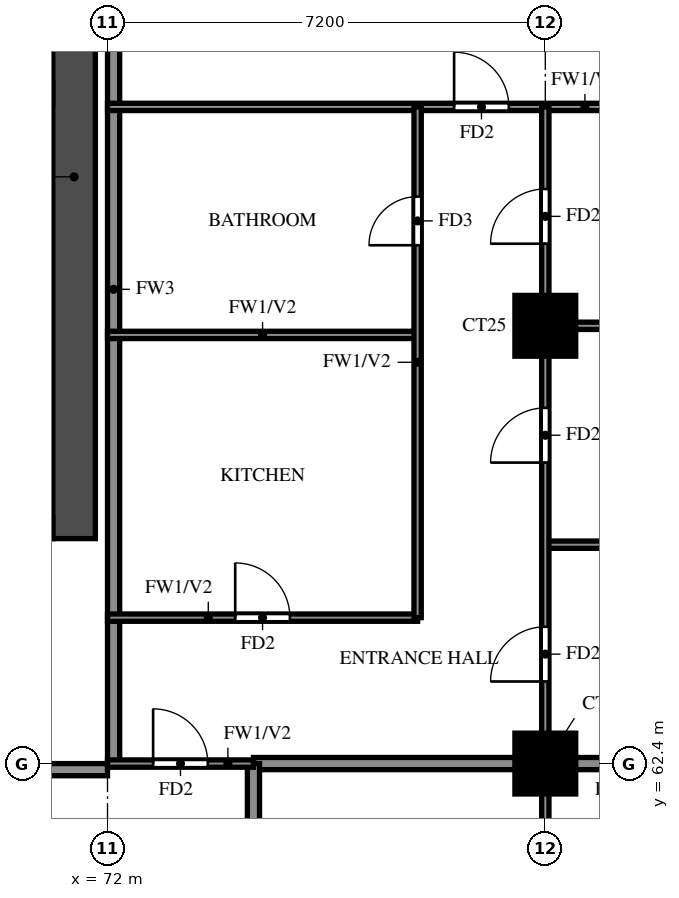
"""IFC4 building model, lengths in metres.
Left out: names, types, materials, properties, quantities, classifications, styles, units other than length and angle.
Written with IfcOpenShell. Run it as: python <this file> out.ifc"""

import sys

from ifc_helpers import new_model, si_unit, direction, frame, frame_2d, origin, origin_2d, place, context, subcontext, project, spatial, rectangle, extrude, source, transform, mapped, element, fill, save


model = new_model("IFC4")
c1 = context("Model", 3, precision=1e-05, world=origin(), true_north=direction((0.0, 1.0)))
c2 = subcontext(c1, "Body", "Model", "MODEL_VIEW")
j1 = project(units=[si_unit("LENGTHUNIT", "METRE"), si_unit("PLANEANGLEUNIT", "RADIAN")], contexts=[c1])
p1 = place(None, origin())
s1 = spatial("IfcSite", under=j1, at=p1, CompositionType="ELEMENT")
p2 = place(p1, origin())
s2 = spatial("IfcBuilding", under=s1, at=p2, CompositionType="ELEMENT")
p3 = place(p2, frame((0.0, 0.0, 157.0)))
s3 = spatial("IfcBuildingStorey", under=s2, at=p3, CompositionType="ELEMENT", Elevation=157.0)
m1 = source(origin(), c2, "Body", "SweptSolid", [
    extrude(rectangle(XDim=1.0, YDim=1.0, at=origin_2d()), origin(), (0.0, 0.0, 1.0), 3.2),
])
for number, where, z_axis, x_axis in (
    (1, (79.2, 62.4, 0.0), (0.0, 0.0, 1.0), (1.0, 0.0, 0.0)),
    (2, (79.2, 69.6, 0.0), (0.0, 0.0, 1.0), (1.0, 0.0, 0.0)),
):
    element("IfcColumn", number, at=place(p3, frame(where, z_axis=z_axis, x_axis=x_axis)), inside=s3, PredefinedType="COLUMN", context=c2, shape_type="MappedRepresentation", body=[
        mapped(m1, transform((0.0, 0.0, 0.0))),
    ])
p4 = place(p3, frame((71.45, 66.1, 0.0), z_axis=(0.0, 0.0, 1.0), x_axis=(0.0, 1.0, 0.0)))
e3 = element("IfcWall", 3, at=p4, inside=s3, PredefinedType="SHEAR", context=c2, shape_type="SweptSolid", body=[
    extrude(rectangle(XDim=11.9, YDim=0.7, at=frame_2d((5.95, 0.0))), origin(), (0.0, 0.0, 1.0), 3.2),
])
p5 = place(p3, frame((29.7, 66.275, 0.0), z_axis=(0.0, 0.0, 1.0), x_axis=(1.0, 0.0, 0.0)))
e4 = element("IfcWall", 4, at=p5, inside=s3, PredefinedType="SHEAR", context=c2, shape_type="SweptSolid", body=[
    extrude(rectangle(XDim=41.4, YDim=0.35, at=frame_2d((20.7, 0.0))), origin(), (0.0, 0.0, 1.0), 3.2),
])
p6 = place(p5, frame((0.925, 0.0, 0.0)))
e5 = element("IfcOpeningElement", 5, at=p6, cuts=e4, PredefinedType="OPENING", context=c2, shape_type="SweptSolid", body=[
    extrude(rectangle(XDim=1.1, YDim=2.1, at=frame_2d((0.55, 1.05))), frame((0.0, 0.185, 0.0), z_axis=(0.0, -1.0, 0.0), x_axis=(1.0, 0.0, 0.0)), (0.0, 0.0, 1.0), 0.37),
])
p7 = place(p5, frame((3.712, 0.0, 0.0)))
e6 = element("IfcOpeningElement", 6, at=p7, cuts=e4, PredefinedType="OPENING", context=c2, shape_type="SweptSolid", body=[
    extrude(rectangle(XDim=1.8, YDim=2.1, at=frame_2d((0.9, 1.05))), frame((0.0, 0.185, 0.0), z_axis=(0.0, -1.0, 0.0), x_axis=(1.0, 0.0, 0.0)), (0.0, 0.0, 1.0), 0.37),
])
p8 = place(p3, frame((67.2, 62.3, 0.0), z_axis=(0.0, 0.0, 1.0), x_axis=(1.0, 0.0, 0.0)))
e7 = element("IfcWall", 7, at=p8, inside=s3, PredefinedType="SOLIDWALL", context=c2, shape_type="SweptSolid", body=[
    extrude(rectangle(XDim=4.8, YDim=0.2, at=frame_2d((2.4, 0.0))), origin(), (0.0, 0.0, 1.0), 3.2),
])
p9 = place(p3, frame((72.1, 62.4, 0.0), z_axis=(0.0, 0.0, 1.0), x_axis=(0.0, 1.0, 0.0)))
e8 = element("IfcWall", 8, at=p9, inside=s3, PredefinedType="SOLIDWALL", context=c2, shape_type="SweptSolid", body=[
    extrude(rectangle(XDim=15.6, YDim=0.2, at=frame_2d((7.8, 0.0))), origin(), (0.0, 0.0, 1.0), 3.2),
])
p10 = place(p3, frame((74.4, 62.4, 0.0), z_axis=(0.0, 0.0, 1.0), x_axis=(1.0, 0.0, 0.0)))
e9 = element("IfcWall", 9, at=p10, inside=s3, PredefinedType="SOLIDWALL", context=c2, shape_type="SweptSolid", body=[
    extrude(rectangle(XDim=11.875, YDim=0.2, at=frame_2d((5.938, 0.0))), origin(), (0.0, 0.0, 1.0), 3.2),
])
p11 = place(p3, frame((74.4, 60.0, 0.0), z_axis=(0.0, 0.0, 1.0), x_axis=(0.0, 1.0, 0.0)))
e10 = element("IfcWall", 10, at=p11, inside=s3, PredefinedType="SOLIDWALL", context=c2, shape_type="SweptSolid", body=[
    extrude(rectangle(XDim=2.4, YDim=0.2, at=frame_2d((1.2, 0.0))), origin(), (0.0, 0.0, 1.0), 3.2),
])
p12 = place(p3, frame((72.0, 62.4, 0.0), z_axis=(0.0, 0.0, 1.0), x_axis=(1.0, 0.0, 0.0)))
e11 = element("IfcWall", 11, at=p12, inside=s3, PredefinedType="PARTITIONING", context=c2, shape_type="SweptSolid", body=[
    extrude(rectangle(XDim=2.4, YDim=0.12, at=frame_2d((1.2, 0.0))), origin(), (0.0, 0.0, 1.0), 3.2),
])
p13 = place(p12, frame((0.75, 0.0, 0.0)))
e12 = element("IfcOpeningElement", 12, at=p13, cuts=e11, PredefinedType="OPENING", context=c2, shape_type="SweptSolid", body=[
    extrude(rectangle(XDim=0.9, YDim=2.1, at=frame_2d((0.45, 1.05))), frame((0.0, 0.07, 0.0), z_axis=(0.0, -1.0, 0.0), x_axis=(1.0, 0.0, 0.0)), (0.0, 0.0, 1.0), 0.14),
])
p14 = place(p3, frame((72.0, 64.8, 0.0), z_axis=(0.0, 0.0, 1.0), x_axis=(1.0, 0.0, 0.0)))
e13 = element("IfcWall", 13, at=p14, inside=s3, PredefinedType="PARTITIONING", context=c2, shape_type="SweptSolid", body=[
    extrude(rectangle(XDim=5.1, YDim=0.12, at=frame_2d((2.55, 0.0))), origin(), (0.0, 0.0, 1.0), 3.2),
])
p15 = place(p14, frame((2.1, 0.0, 0.0)))
e14 = element("IfcOpeningElement", 14, at=p15, cuts=e13, PredefinedType="OPENING", context=c2, shape_type="SweptSolid", body=[
    extrude(rectangle(XDim=0.9, YDim=2.1, at=frame_2d((0.45, 1.05))), frame((0.0, 0.07, 0.0), z_axis=(0.0, -1.0, 0.0), x_axis=(1.0, 0.0, 0.0)), (0.0, 0.0, 1.0), 0.14),
])
p16 = place(p3, frame((79.2, 66.0, 0.0), z_axis=(0.0, 0.0, 1.0), x_axis=(1.0, 0.0, 0.0)))
e15 = element("IfcWall", 15, at=p16, inside=s3, PredefinedType="PARTITIONING", context=c2, shape_type="SweptSolid", body=[
    extrude(rectangle(XDim=7.075, YDim=0.12, at=frame_2d((3.538, 0.0))), origin(), (0.0, 0.0, 1.0), 2.3),
])
p17 = place(p3, frame((72.0, 69.45, 0.0), z_axis=(0.0, 0.0, 1.0), x_axis=(1.0, 0.0, 0.0)))
e16 = element("IfcWall", 16, at=p17, inside=s3, PredefinedType="PARTITIONING", context=c2, shape_type="SweptSolid", body=[
    extrude(rectangle(XDim=5.1, YDim=0.12, at=frame_2d((2.55, 0.0))), origin(), (0.0, 0.0, 1.0), 3.2),
])
p18 = place(p3, frame((79.2, 69.6, 0.0), z_axis=(0.0, 0.0, 1.0), x_axis=(1.0, 0.0, 0.0)))
e17 = element("IfcWall", 17, at=p18, inside=s3, PredefinedType="PARTITIONING", context=c2, shape_type="SweptSolid", body=[
    extrude(rectangle(XDim=7.075, YDim=0.12, at=frame_2d((3.538, 0.0))), origin(), (0.0, 0.0, 1.0), 3.2),
])
p19 = place(p3, frame((72.0, 73.2, 0.0), z_axis=(0.0, 0.0, 1.0), x_axis=(1.0, 0.0, 0.0)))
e18 = element("IfcWall", 18, at=p19, inside=s3, PredefinedType="PARTITIONING", context=c2, shape_type="SweptSolid", body=[
    extrude(rectangle(XDim=14.275, YDim=0.12, at=frame_2d((7.137, 0.0))), origin(), (0.0, 0.0, 1.0), 2.3),
])
p20 = place(p19, frame((5.7, 0.0, 0.0)))
e19 = element("IfcOpeningElement", 19, at=p20, cuts=e18, PredefinedType="OPENING", context=c2, shape_type="SweptSolid", body=[
    extrude(rectangle(XDim=0.9, YDim=2.1, at=frame_2d((0.45, 1.05))), frame((0.0, 0.07, 0.0), z_axis=(0.0, -1.0, 0.0), x_axis=(1.0, 0.0, 0.0)), (0.0, 0.0, 1.0), 0.14),
])
p21 = place(p3, frame((77.1, 64.8, 0.0), z_axis=(0.0, 0.0, 1.0), x_axis=(0.0, 1.0, 0.0)))
e20 = element("IfcWall", 20, at=p21, inside=s3, PredefinedType="PARTITIONING", context=c2, shape_type="SweptSolid", body=[
    extrude(rectangle(XDim=8.4, YDim=0.12, at=frame_2d((4.2, 0.0))), origin(), (0.0, 0.0, 1.0), 3.2),
])
p22 = place(p21, frame((6.125, 0.0, 0.0)))
e21 = element("IfcOpeningElement", 21, at=p22, cuts=e20, PredefinedType="OPENING", context=c2, shape_type="SweptSolid", body=[
    extrude(rectangle(XDim=0.8, YDim=2.1, at=frame_2d((0.4, 1.05))), frame((0.0, 0.07, 0.0), z_axis=(0.0, -1.0, 0.0), x_axis=(1.0, 0.0, 0.0)), (0.0, 0.0, 1.0), 0.14),
])
p23 = place(p3, frame((79.2, 48.125, 0.0), z_axis=(0.0, 0.0, 1.0), x_axis=(0.0, 1.0, 0.0)))
e22 = element("IfcWall", 22, at=p23, inside=s3, PredefinedType="PARTITIONING", context=c2, shape_type="SweptSolid", body=[
    extrude(rectangle(XDim=25.075, YDim=0.12, at=frame_2d((12.538, 0.0))), origin(), (0.0, 0.0, 1.0), 3.2),
])
p24 = place(p23, frame((1.288, 0.0, 0.0)))
e23 = element("IfcOpeningElement", 23, at=p24, cuts=e22, PredefinedType="OPENING", context=c2, shape_type="SweptSolid", body=[
    extrude(rectangle(XDim=0.9, YDim=2.1, at=frame_2d((0.45, 1.05))), frame((0.0, 0.07, 0.0), z_axis=(0.0, -1.0, 0.0), x_axis=(1.0, 0.0, 0.0)), (0.0, 0.0, 1.0), 0.14),
])
p25 = place(p23, frame((4.825, 0.0, 0.0)))
e24 = element("IfcOpeningElement", 24, at=p25, cuts=e22, PredefinedType="OPENING", context=c2, shape_type="SweptSolid", body=[
    extrude(rectangle(XDim=0.9, YDim=2.1, at=frame_2d((0.45, 1.05))), frame((0.0, 0.07, 0.0), z_axis=(0.0, -1.0, 0.0), x_axis=(1.0, 0.0, 0.0)), (0.0, 0.0, 1.0), 0.14),
])
p26 = place(p23, frame((9.925, 0.0, 0.0)))
e25 = element("IfcOpeningElement", 25, at=p26, cuts=e22, PredefinedType="OPENING", context=c2, shape_type="SweptSolid", body=[
    extrude(rectangle(XDim=1.5, YDim=2.1, at=frame_2d((0.75, 1.05))), frame((0.0, 0.07, 0.0), z_axis=(0.0, -1.0, 0.0), x_axis=(1.0, 0.0, 0.0)), (0.0, 0.0, 1.0), 0.14),
])
p27 = place(p23, frame((15.625, 0.0, 0.0)))
e26 = element("IfcOpeningElement", 26, at=p27, cuts=e22, PredefinedType="OPENING", context=c2, shape_type="SweptSolid", body=[
    extrude(rectangle(XDim=0.9, YDim=2.1, at=frame_2d((0.45, 1.05))), frame((0.0, 0.07, 0.0), z_axis=(0.0, -1.0, 0.0), x_axis=(1.0, 0.0, 0.0)), (0.0, 0.0, 1.0), 0.14),
])
p28 = place(p23, frame((19.225, 0.0, 0.0)))
e27 = element("IfcOpeningElement", 27, at=p28, cuts=e22, PredefinedType="OPENING", context=c2, shape_type="SweptSolid", body=[
    extrude(rectangle(XDim=0.9, YDim=2.1, at=frame_2d((0.45, 1.05))), frame((0.0, 0.07, 0.0), z_axis=(0.0, -1.0, 0.0), x_axis=(1.0, 0.0, 0.0)), (0.0, 0.0, 1.0), 0.14),
])
p29 = place(p23, frame((22.825, 0.0, 0.0)))
e28 = element("IfcOpeningElement", 28, at=p29, cuts=e22, PredefinedType="OPENING", context=c2, shape_type="SweptSolid", body=[
    extrude(rectangle(XDim=0.9, YDim=2.1, at=frame_2d((0.45, 1.05))), frame((0.0, 0.07, 0.0), z_axis=(0.0, -1.0, 0.0), x_axis=(1.0, 0.0, 0.0)), (0.0, 0.0, 1.0), 0.14),
])
p30 = place(p13, origin())
e29 = element("IfcDoor", 29, at=p30, inside=s3, OperationType="SINGLE_SWING_LEFT", PredefinedType="DOOR", context=c2, shape_type="SweptSolid", body=[
    extrude(rectangle(XDim=0.9, YDim=2.1, at=frame_2d((0.45, 1.05))), frame((0.0, 0.025, 0.0), z_axis=(0.0, -1.0, 0.0), x_axis=(1.0, 0.0, 0.0)), (0.0, 0.0, 1.0), 0.05),
])
fill(e12, e29)
p31 = place(p27, origin())
e30 = element("IfcDoor", 30, at=p31, inside=s3, OperationType="SINGLE_SWING_LEFT", PredefinedType="DOOR", context=c2, shape_type="SweptSolid", body=[
    extrude(rectangle(XDim=0.9, YDim=2.1, at=frame_2d((0.45, 1.05))), frame((0.0, 0.025, 0.0), z_axis=(0.0, -1.0, 0.0), x_axis=(1.0, 0.0, 0.0)), (0.0, 0.0, 1.0), 0.05),
])
fill(e26, e30)
p32 = place(p28, origin())
e31 = element("IfcDoor", 31, at=p32, inside=s3, OperationType="SINGLE_SWING_LEFT", PredefinedType="DOOR", context=c2, shape_type="SweptSolid", body=[
    extrude(rectangle(XDim=0.9, YDim=2.1, at=frame_2d((0.45, 1.05))), frame((0.0, 0.025, 0.0), z_axis=(0.0, -1.0, 0.0), x_axis=(1.0, 0.0, 0.0)), (0.0, 0.0, 1.0), 0.05),
])
fill(e27, e31)
p33 = place(p29, origin())
e32 = element("IfcDoor", 32, at=p33, inside=s3, OperationType="SINGLE_SWING_RIGHT", PredefinedType="DOOR", context=c2, shape_type="SweptSolid", body=[
    extrude(rectangle(XDim=0.9, YDim=2.1, at=frame_2d((0.45, 1.05))), frame((0.0, 0.025, 0.0), z_axis=(0.0, -1.0, 0.0), x_axis=(1.0, 0.0, 0.0)), (0.0, 0.0, 1.0), 0.05),
])
fill(e28, e32)
p34 = place(p20, origin())
e33 = element("IfcDoor", 33, at=p34, inside=s3, OperationType="SINGLE_SWING_LEFT", PredefinedType="DOOR", context=c2, shape_type="SweptSolid", body=[
    extrude(rectangle(XDim=0.9, YDim=2.1, at=frame_2d((0.45, 1.05))), frame((0.0, 0.025, 0.0), z_axis=(0.0, -1.0, 0.0), x_axis=(1.0, 0.0, 0.0)), (0.0, 0.0, 1.0), 0.05),
])
fill(e19, e33)
p35 = place(p15, origin())
e34 = element("IfcDoor", 34, at=p35, inside=s3, OperationType="SINGLE_SWING_LEFT", PredefinedType="DOOR", context=c2, shape_type="SweptSolid", body=[
    extrude(rectangle(XDim=0.9, YDim=2.1, at=frame_2d((0.45, 1.05))), frame((0.0, 0.025, 0.0), z_axis=(0.0, -1.0, 0.0), x_axis=(1.0, 0.0, 0.0)), (0.0, 0.0, 1.0), 0.05),
])
fill(e14, e34)
p36 = place(p22, origin())
e35 = element("IfcDoor", 35, at=p36, inside=s3, OperationType="SINGLE_SWING_RIGHT", PredefinedType="DOOR", context=c2, shape_type="SweptSolid", body=[
    extrude(rectangle(XDim=0.8, YDim=2.1, at=frame_2d((0.4, 1.05))), frame((0.0, 0.025, 0.0), z_axis=(0.0, -1.0, 0.0), x_axis=(1.0, 0.0, 0.0)), (0.0, 0.0, 1.0), 0.05),
])
fill(e21, e35)
save(model, sys.argv[1])
